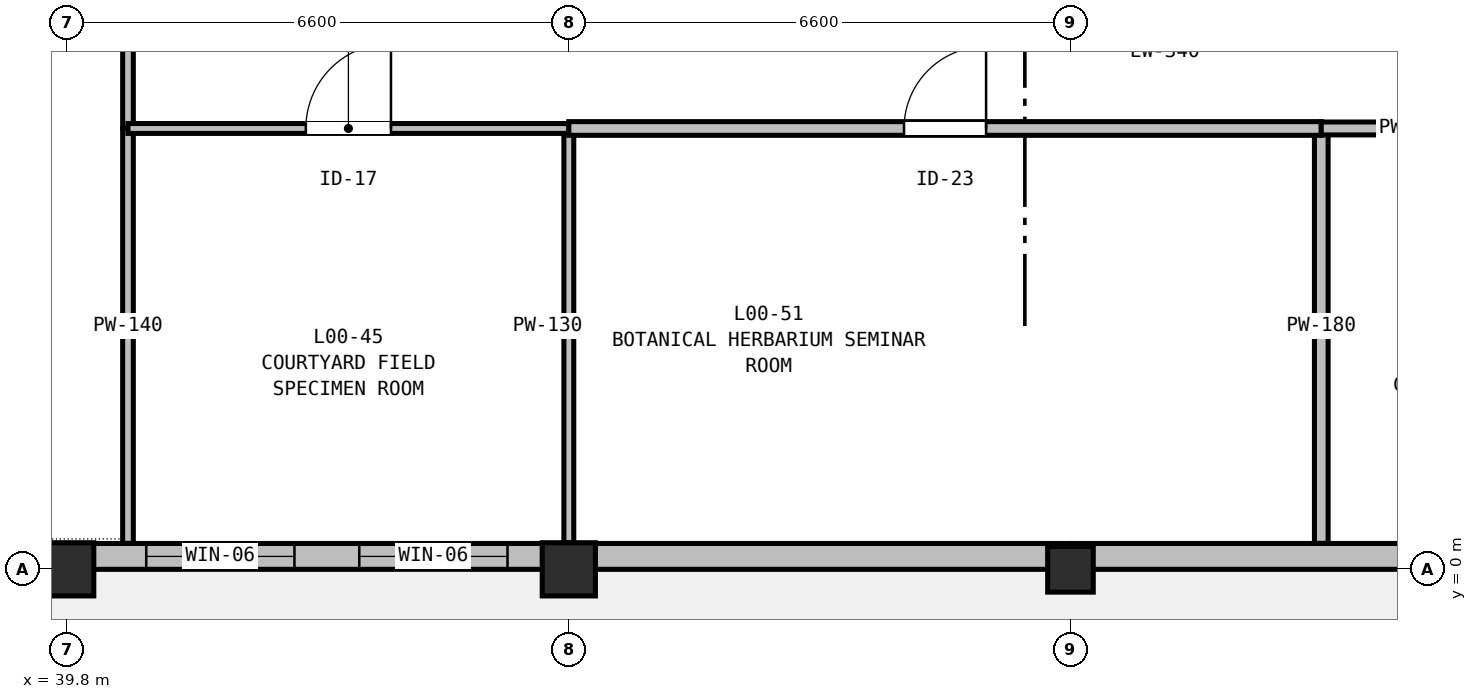
"""IFC4 building model, lengths in metres.
Left out: names, types, materials, properties, quantities, classifications, styles, units other than length and angle.
Written with IfcOpenShell. Run it as: python <this file> out.ifc"""

import sys

from ifc_helpers import new_model, si_unit, direction, frame, frame_2d, origin, origin_2d, place, context, subcontext, project, spatial, rectangle, extrude, element, fill, save


model = new_model("IFC4")
c1 = context("Model", 3, precision=1e-05, world=origin(), true_north=direction((0.0, 1.0)))
c2 = subcontext(c1, "Body", "Model", "MODEL_VIEW")
j1 = project(units=[si_unit("LENGTHUNIT", "METRE"), si_unit("PLANEANGLEUNIT", "RADIAN")], contexts=[c1])
p1 = place(None, origin())
s1 = spatial("IfcSite", under=j1, at=p1, CompositionType="ELEMENT")
p2 = place(p1, origin())
s2 = spatial("IfcBuilding", under=s1, at=p2, CompositionType="ELEMENT")
p3 = place(p2, origin())
s3 = spatial("IfcBuildingStorey", under=s2, at=p3, CompositionType="ELEMENT", Elevation=0.0)
for number, where, z_axis, x_axis in (
    (1, (39.8, 0.0, -0.32), (0.0, 0.0, 1.0), (1.0, 0.0, 0.0)),
    (2, (46.4, 0.0, -0.32), (0.0, 0.0, 1.0), (1.0, 0.0, 0.0)),
):
    element("IfcColumn", number, at=place(p3, frame(where, z_axis=z_axis, x_axis=x_axis)), inside=s3, PredefinedType="COLUMN", context=c2, shape_type="SweptSolid", body=[
        extrude(rectangle(XDim=0.7, YDim=0.7, at=origin_2d()), origin(), (0.0, 0.0, 1.0), 5.66),
    ])
p4 = place(p3, frame((53.0, 0.0, -0.32), z_axis=(0.0, 0.0, 1.0), x_axis=(1.0, 0.0, 0.0)))
e3 = element("IfcColumn", 3, at=p4, inside=s3, PredefinedType="COLUMN", context=c2, shape_type="SweptSolid", body=[
    extrude(rectangle(XDim=0.6, YDim=0.6, at=origin_2d()), origin(), (0.0, 0.0, 1.0), 5.66),
])
p5 = place(p3, frame((46.4, 0.17, 0.0), z_axis=(0.0, 0.0, 1.0), x_axis=(-1.0, 0.0, 0.0)))
e4 = element("IfcWall", 4, at=p5, inside=s3, PredefinedType="STANDARD", context=c2, shape_type="SweptSolid", body=[
    extrude(rectangle(XDim=6.6, YDim=0.34, at=frame_2d((3.3, 0.0))), origin(), (0.0, 0.0, 1.0), 4.535),
])
p6 = place(p5, frame((0.807, 0.0, 0.9)))
e5 = element("IfcOpeningElement", 5, at=p6, cuts=e4, PredefinedType="OPENING", context=c2, shape_type="SweptSolid", body=[
    extrude(rectangle(XDim=1.95, YDim=2.1, at=frame_2d((0.975, 1.05))), frame((0.0, 0.18, 0.0), z_axis=(0.0, -1.0, 0.0), x_axis=(1.0, 0.0, 0.0)), (0.0, 0.0, 1.0), 0.36),
])
p7 = place(p5, frame((3.61, 0.0, 0.9)))
e6 = element("IfcOpeningElement", 6, at=p7, cuts=e4, PredefinedType="OPENING", context=c2, shape_type="SweptSolid", body=[
    extrude(rectangle(XDim=1.95, YDim=2.1, at=frame_2d((0.975, 1.05))), frame((0.0, 0.18, 0.0), z_axis=(0.0, -1.0, 0.0), x_axis=(1.0, 0.0, 0.0)), (0.0, 0.0, 1.0), 0.36),
])
p8 = place(p3, frame((39.8, 0.17, 0.0), z_axis=(0.0, 0.0, 1.0), x_axis=(-1.0, 0.0, 0.0)))
e7 = element("IfcWall", 7, at=p8, inside=s3, PredefinedType="STANDARD", context=c2, shape_type="SweptSolid", body=[
    extrude(rectangle(XDim=6.6, YDim=0.34, at=frame_2d((3.3, 0.0))), origin(), (0.0, 0.0, 1.0), 4.535),
])
p9 = place(p8, frame((2.5, 0.0, 0.0)))
e8 = element("IfcOpeningElement", 8, at=p9, cuts=e7, PredefinedType="OPENING", context=c2, shape_type="SweptSolid", body=[
    extrude(rectangle(XDim=1.6, YDim=2.2, at=frame_2d((0.8, 1.1))), frame((0.0, 0.18, 0.0), z_axis=(0.0, -1.0, 0.0), x_axis=(1.0, 0.0, 0.0)), (0.0, 0.0, 1.0), 0.36),
])
for number, where, z_axis, x_axis in (
    (9, (59.6, 0.17, 0.0), (0.0, 0.0, 1.0), (-1.0, 0.0, 0.0)),
    (10, (53.0, 0.17, 0.0), (0.0, 0.0, 1.0), (-1.0, 0.0, 0.0)),
):
    element("IfcWall", number, at=place(p3, frame(where, z_axis=z_axis, x_axis=x_axis)), inside=s3, PredefinedType="STANDARD", context=c2, shape_type="SweptSolid", body=[
        extrude(rectangle(XDim=6.6, YDim=0.34, at=frame_2d((3.3, 0.0))), origin(), (0.0, 0.0, 1.0), 4.535),
    ])
p10 = place(p3, frame((40.6, 23.0, 0.0), z_axis=(0.0, 0.0, 1.0), x_axis=(0.0, -1.0, 0.0)))
e11 = element("IfcWall", 11, at=p10, inside=s3, PredefinedType="PARTITIONING", context=c2, shape_type="SweptSolid", body=[
    extrude(rectangle(XDim=17.2, YDim=0.14, at=frame_2d((8.6, 0.0))), origin(), (0.0, 0.0, 1.0), 4.735),
])
p11 = place(p10, frame((8.065, 0.0, 0.0)))
e12 = element("IfcOpeningElement", 12, at=p11, cuts=e11, PredefinedType="OPENING", context=c2, shape_type="SweptSolid", body=[
    extrude(rectangle(XDim=1.07, YDim=2.1, at=frame_2d((0.535, 1.05))), frame((0.0, 0.08, 0.0), z_axis=(0.0, -1.0, 0.0), x_axis=(1.0, 0.0, 0.0)), (0.0, 0.0, 1.0), 0.16),
])
p12 = place(p3, frame((40.6, 5.8, 0.0), z_axis=(0.0, 0.0, 1.0), x_axis=(0.0, -1.0, 0.0)))
e13 = element("IfcWall", 13, at=p12, inside=s3, PredefinedType="PARTITIONING", context=c2, shape_type="SweptSolid", body=[
    extrude(rectangle(XDim=5.458, YDim=0.14, at=frame_2d((2.729, 0.0))), origin(), (0.0, 0.0, 1.0), 5.095),
])
p13 = place(p3, frame((46.4, 5.8, 0.0), z_axis=(0.0, 0.0, 1.0), x_axis=(0.0, -1.0, 0.0)))
e14 = element("IfcWall", 14, at=p13, inside=s3, PredefinedType="PARTITIONING", context=c2, shape_type="SweptSolid", body=[
    extrude(rectangle(XDim=5.45, YDim=0.13, at=frame_2d((2.725, 0.0))), origin(), (0.0, 0.0, 1.0), 4.535),
])
p14 = place(p3, frame((40.6, 5.8, 0.0), z_axis=(0.0, 0.0, 1.0), x_axis=(1.0, 0.0, 0.0)))
e15 = element("IfcWall", 15, at=p14, inside=s3, PredefinedType="PARTITIONING", context=c2, shape_type="SweptSolid", body=[
    extrude(rectangle(XDim=5.8, YDim=0.13, at=frame_2d((2.9, 0.0))), origin(), (0.0, 0.0, 1.0), 4.535),
])
p15 = place(p14, frame((2.34, 0.0, 0.0)))
e16 = element("IfcOpeningElement", 16, at=p15, cuts=e15, PredefinedType="OPENING", context=c2, shape_type="SweptSolid", body=[
    extrude(rectangle(XDim=1.12, YDim=2.1, at=frame_2d((0.56, 1.05))), frame((0.0, 0.075, 0.0), z_axis=(0.0, -1.0, 0.0), x_axis=(1.0, 0.0, 0.0)), (0.0, 0.0, 1.0), 0.15),
])
p16 = place(p3, frame((56.3, 5.8, 0.0), z_axis=(0.0, 0.0, 1.0), x_axis=(0.0, -1.0, 0.0)))
e17 = element("IfcWall", 17, at=p16, inside=s3, PredefinedType="PARTITIONING", context=c2, shape_type="SweptSolid", body=[
    extrude(rectangle(XDim=5.458, YDim=0.18, at=frame_2d((2.729, 0.0))), origin(), (0.0, 0.0, 1.0), 4.685),
])
p17 = place(p3, frame((46.4, 5.8, 0.0), z_axis=(0.0, 0.0, 1.0), x_axis=(1.0, 0.0, 0.0)))
e18 = element("IfcWall", 18, at=p17, inside=s3, PredefinedType="PARTITIONING", context=c2, shape_type="SweptSolid", body=[
    extrude(rectangle(XDim=9.9, YDim=0.18, at=frame_2d((4.95, 0.0))), origin(), (0.0, 0.0, 1.0), 4.535),
])
p18 = place(p17, frame((4.41, 0.0, 0.0)))
e19 = element("IfcOpeningElement", 19, at=p18, cuts=e18, PredefinedType="OPENING", context=c2, shape_type="SweptSolid", body=[
    extrude(rectangle(XDim=1.08, YDim=2.14, at=frame_2d((0.54, 1.07))), frame((0.0, 0.1, 0.0), z_axis=(0.0, -1.0, 0.0), x_axis=(1.0, 0.0, 0.0)), (0.0, 0.0, 1.0), 0.2),
])
p19 = place(p3, frame((56.3, 5.8, 0.0), z_axis=(0.0, 0.0, 1.0), x_axis=(1.0, 0.0, 0.0)))
e20 = element("IfcWall", 20, at=p19, inside=s3, PredefinedType="PARTITIONING", context=c2, shape_type="SweptSolid", body=[
    extrude(rectangle(XDim=9.558, YDim=0.17, at=frame_2d((4.779, 0.0))), origin(), (0.0, 0.0, 1.0), 4.535),
])
p20 = place(p19, frame((4.199, 0.0, 0.0)))
e21 = element("IfcOpeningElement", 21, at=p20, cuts=e20, PredefinedType="OPENING", context=c2, shape_type="SweptSolid", body=[
    extrude(rectangle(XDim=1.16, YDim=2.14, at=frame_2d((0.58, 1.07))), frame((0.0, 0.095, 0.0), z_axis=(0.0, -1.0, 0.0), x_axis=(1.0, 0.0, 0.0)), (0.0, 0.0, 1.0), 0.19),
])
p21 = place(p6, origin())
e22 = element("IfcWindow", 22, at=p21, inside=s3, PartitioningType="SINGLE_PANEL", PredefinedType="WINDOW", context=c2, shape_type="SweptSolid", body=[
    extrude(rectangle(XDim=1.95, YDim=2.1, at=frame_2d((0.975, 1.05))), frame((0.0, 0.03, 0.0), z_axis=(0.0, -1.0, 0.0), x_axis=(1.0, 0.0, 0.0)), (0.0, 0.0, 1.0), 0.06),
])
fill(e5, e22)
p22 = place(p7, origin())
e23 = element("IfcWindow", 23, at=p22, inside=s3, PartitioningType="SINGLE_PANEL", PredefinedType="WINDOW", context=c2, shape_type="SweptSolid", body=[
    extrude(rectangle(XDim=1.95, YDim=2.1, at=frame_2d((0.975, 1.05))), frame((0.0, 0.03, 0.0), z_axis=(0.0, -1.0, 0.0), x_axis=(1.0, 0.0, 0.0)), (0.0, 0.0, 1.0), 0.06),
])
fill(e6, e23)
p23 = place(p15, origin())
e24 = element("IfcDoor", 24, at=p23, inside=s3, OperationType="SINGLE_SWING_RIGHT", PredefinedType="DOOR", context=c2, shape_type="SweptSolid", body=[
    extrude(rectangle(XDim=1.12, YDim=2.1, at=frame_2d((0.56, 1.05))), frame((0.0, 0.025, 0.0), z_axis=(0.0, -1.0, 0.0), x_axis=(1.0, 0.0, 0.0)), (0.0, 0.0, 1.0), 0.05),
])
fill(e16, e24)
p24 = place(p18, origin())
e25 = element("IfcDoor", 25, at=p24, inside=s3, OperationType="SINGLE_SWING_RIGHT", PredefinedType="DOOR", context=c2, shape_type="SweptSolid", body=[
    extrude(rectangle(XDim=1.08, YDim=2.14, at=frame_2d((0.54, 1.07))), frame((0.0, 0.025, 0.0), z_axis=(0.0, -1.0, 0.0), x_axis=(1.0, 0.0, 0.0)), (0.0, 0.0, 1.0), 0.05),
])
fill(e19, e25)
save(model, sys.argv[1])
